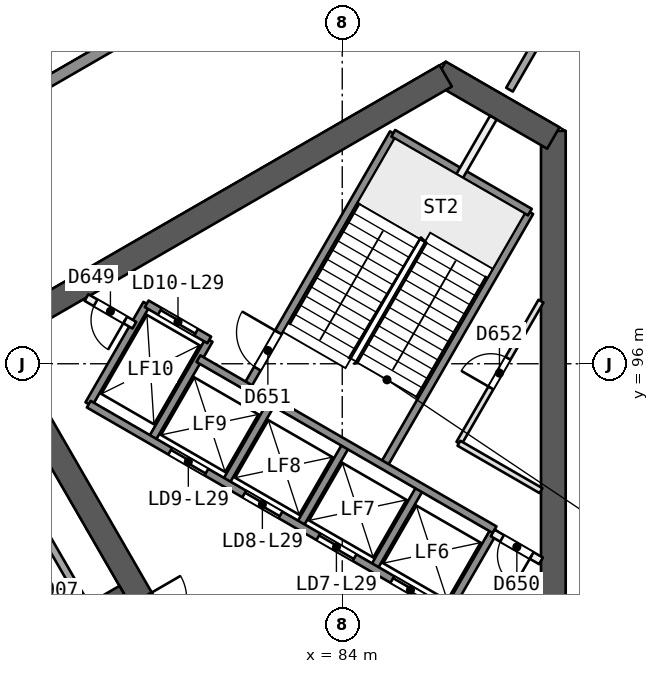
"""IFC4 building model, lengths in metres.
Left out: names, types, materials, properties, quantities, classifications, styles, units other than length and angle.
Written with IfcOpenShell. Run it as: python <this file> out.ifc"""

import sys

from ifc_helpers import new_model, si_unit, direction, frame, frame_2d, origin, place, context, subcontext, project, spatial, rectangle, extrude, element, fill, save


model = new_model("IFC4")
c1 = context("Model", 3, precision=1e-05, world=origin(), true_north=direction((0.0, 1.0)))
c2 = subcontext(c1, "Body", "Model", "MODEL_VIEW")
j1 = project(units=[si_unit("LENGTHUNIT", "METRE"), si_unit("PLANEANGLEUNIT", "RADIAN")], contexts=[c1])
p1 = place(None, origin())
s1 = spatial("IfcSite", under=j1, at=p1, CompositionType="ELEMENT")
p2 = place(p1, origin())
s2 = spatial("IfcBuilding", under=s1, at=p2, CompositionType="ELEMENT")
p3 = place(p2, frame((0.0, 0.0, 121.6)))
s3 = spatial("IfcBuildingStorey", under=s2, at=p3, CompositionType="ELEMENT", Elevation=121.6)
p4 = place(p3, frame((89.555, 88.119, 0.0), z_axis=(0.0, 0.0, 1.0), x_axis=(0.0, 1.0, 0.0)))
e1 = element("IfcWall", 1, at=p4, inside=s3, PredefinedType="SHEAR", context=c2, shape_type="SweptSolid", body=[
    extrude(rectangle(XDim=14.009, YDim=0.65, at=frame_2d((7.004, 0.0))), origin(), (0.0, 0.0, 1.0), 3.7),
])
p5 = place(p3, frame((89.555, 101.94, 0.0), z_axis=(0.0, 0.0, 1.0), x_axis=(-0.866031550877, 0.499989352773, 0.0)))
e2 = element("IfcWall", 2, at=p5, inside=s3, PredefinedType="SHEAR", context=c2, shape_type="SweptSolid", body=[
    extrude(rectangle(XDim=3.458, YDim=0.65, at=frame_2d((1.729, 0.0))), origin(), (0.0, 0.0, 1.0), 3.7),
])
p6 = place(p3, frame((86.723, 103.575, 0.0), z_axis=(0.0, 0.0, 1.0), x_axis=(-0.866031824457, -0.499988878904, 0.0)))
e3 = element("IfcWall", 3, at=p6, inside=s3, PredefinedType="SHEAR", context=c2, shape_type="SweptSolid", body=[
    extrude(rectangle(XDim=14.146, YDim=0.65, at=frame_2d((7.073, 0.0))), origin(), (0.0, 0.0, 1.0), 3.7),
])
p7 = place(p3, frame((74.754, 96.665, 0.0), z_axis=(0.0, 0.0, 1.0), x_axis=(0.500011799426, -0.866018591275, 0.0)))
e4 = element("IfcWall", 4, at=p7, inside=s3, PredefinedType="SHEAR", context=c2, shape_type="SweptSolid", body=[
    extrude(rectangle(XDim=10.055, YDim=0.65, at=frame_2d((5.027, 0.0))), origin(), (0.0, 0.0, 1.0), 3.7),
])
p8 = place(p7, frame((7.905, 0.0, 0.0)))
e5 = element("IfcOpeningElement", 5, at=p8, cuts=e4, PredefinedType="OPENING", context=c2, shape_type="SweptSolid", body=[
    extrude(rectangle(XDim=1.2, YDim=2.1, at=frame_2d((0.6, 1.05))), frame((0.0, 0.335, 0.0), z_axis=(0.0, -1.0, 0.0), x_axis=(1.0, 0.0, 0.0)), (0.0, 0.0, 1.0), 0.671),
])
p9 = place(p3, frame((78.2, 90.046, 0.0), z_axis=(0.0, 0.0, 1.0), x_axis=(-0.866026492143, -0.499998114903, 0.0)))
e6 = element("IfcWall", 6, at=p9, inside=s3, PredefinedType="SHEAR", context=c2, shape_type="SweptSolid", body=[
    extrude(rectangle(XDim=15.588, YDim=0.25, at=frame_2d((7.794, 0.0))), origin(), (0.0, 0.0, 1.0), 3.25),
])
p10 = place(p9, frame((1.527, 0.0, 0.0)))
e7 = element("IfcOpeningElement", 7, at=p10, cuts=e6, PredefinedType="OPENING", context=c2, shape_type="SweptSolid", body=[
    extrude(rectangle(XDim=1.0, YDim=2.1, at=frame_2d((0.5, 1.05))), frame((0.0, 0.135, 0.0), z_axis=(0.0, -1.0, 0.0), x_axis=(1.0, 0.0, 0.0)), (0.0, 0.0, 1.0), 0.271),
])
p11 = place(p9, frame((8.694, 0.0, 0.0)))
e8 = element("IfcOpeningElement", 8, at=p11, cuts=e6, PredefinedType="OPENING", context=c2, shape_type="SweptSolid", body=[
    extrude(rectangle(XDim=1.1, YDim=2.1, at=frame_2d((0.55, 1.05))), frame((0.0, 0.135, 0.0), z_axis=(0.0, -1.0, 0.0), x_axis=(1.0, 0.0, 0.0)), (0.0, 0.0, 1.0), 0.271),
])
p12 = place(p9, frame((13.062, 0.0, 0.0)))
e9 = element("IfcOpeningElement", 9, at=p12, cuts=e6, PredefinedType="OPENING", context=c2, shape_type="SweptSolid", body=[
    extrude(rectangle(XDim=1.0, YDim=2.1, at=frame_2d((0.5, 1.05))), frame((0.0, 0.135, 0.0), z_axis=(0.0, -1.0, 0.0), x_axis=(1.0, 0.0, 0.0)), (0.0, 0.0, 1.0), 0.271),
])
p13 = place(p3, frame((92.073, 109.571, 0.0), z_axis=(0.0, 0.0, 1.0), x_axis=(-0.49997955719, -0.866037206124, 0.0)))
e10 = element("IfcWall", 10, at=p13, inside=s3, PredefinedType="PARTITIONING", context=c2, shape_type="SweptSolid", body=[
    extrude(rectangle(XDim=7.343, YDim=0.2, at=frame_2d((3.671, 0.0))), origin(), (0.0, 0.0, 1.0), 3.25),
])
p14 = place(p3, frame((72.811, 97.327, 0.0), z_axis=(0.0, 0.0, 1.0), x_axis=(0.5000018851, -0.866024315419, 0.0)))
e11 = element("IfcWall", 11, at=p14, inside=s3, PredefinedType="PARTITIONING", context=c2, shape_type="SweptSolid", body=[
    extrude(rectangle(XDim=9.0, YDim=0.2, at=frame_2d((4.5, 0.0))), origin(), (0.0, 0.0, 1.0), 3.25),
])
p15 = place(p3, frame((40.706, 82.891, 0.0), z_axis=(0.0, 0.0, 1.0), x_axis=(0.866024855185, 0.5000009502, 0.0)))
e12 = element("IfcWall", 12, at=p15, inside=s3, PredefinedType="SOLIDWALL", context=c2, shape_type="SweptSolid", body=[
    extrude(rectangle(XDim=56.508, YDim=0.3, at=frame_2d((28.254, 0.0))), origin(), (0.0, 0.0, 1.0), 3.25),
])
p16 = place(p15, frame((27.054, 0.0, 0.0)))
e13 = element("IfcOpeningElement", 13, at=p16, cuts=e12, PredefinedType="OPENING", context=c2, shape_type="SweptSolid", body=[
    extrude(rectangle(XDim=2.4, YDim=2.4, at=frame_2d((1.2, 1.2))), frame((0.0, 0.161, 0.0), z_axis=(0.0, -1.0, 0.0), x_axis=(1.0, 0.0, 0.0)), (0.0, 0.0, 1.0), 0.321),
])
p17 = place(p15, frame((32.822, 0.0, 0.0)))
e14 = element("IfcOpeningElement", 14, at=p17, cuts=e12, PredefinedType="OPENING", context=c2, shape_type="SweptSolid", body=[
    extrude(rectangle(XDim=2.4, YDim=2.4, at=frame_2d((1.2, 1.2))), frame((0.0, 0.161, 0.0), z_axis=(0.0, -1.0, 0.0), x_axis=(1.0, 0.0, 0.0)), (0.0, 0.0, 1.0), 0.321),
])
p18 = place(p15, frame((43.875, 0.0, 0.0)))
e15 = element("IfcOpeningElement", 15, at=p18, cuts=e12, PredefinedType="OPENING", context=c2, shape_type="SweptSolid", body=[
    extrude(rectangle(XDim=2.4, YDim=2.4, at=frame_2d((1.2, 1.2))), frame((0.0, 0.161, 0.0), z_axis=(0.0, -1.0, 0.0), x_axis=(1.0, 0.0, 0.0)), (0.0, 0.0, 1.0), 0.321),
])
p19 = place(p15, frame((21.286, 0.0, 0.0)))
e16 = element("IfcOpeningElement", 16, at=p19, cuts=e12, PredefinedType="OPENING", context=c2, shape_type="SweptSolid", body=[
    extrude(rectangle(XDim=2.4, YDim=2.4, at=frame_2d((1.2, 1.2))), frame((0.0, 0.161, 0.0), z_axis=(0.0, -1.0, 0.0), x_axis=(1.0, 0.0, 0.0)), (0.0, 0.0, 1.0), 0.321),
])
p20 = place(p15, frame((10.251, 0.0, 0.0)))
e17 = element("IfcOpeningElement", 17, at=p20, cuts=e12, PredefinedType="OPENING", context=c2, shape_type="SweptSolid", body=[
    extrude(rectangle(XDim=2.4, YDim=2.4, at=frame_2d((1.2, 1.2))), frame((0.0, 0.161, 0.0), z_axis=(0.0, -1.0, 0.0), x_axis=(1.0, 0.0, 0.0)), (0.0, 0.0, 1.0), 0.321),
])
p21 = place(p3, frame((86.77, 89.486, 0.0), z_axis=(0.0, 0.0, 1.0), x_axis=(0.499961042966, 0.86604789447, 0.0)))
e18 = element("IfcWall", 18, at=p21, inside=s3, PredefinedType="SOLIDWALL", context=c2, shape_type="SweptSolid", body=[
    extrude(rectangle(XDim=2.48, YDim=0.2, at=frame_2d((1.24, 0.0))), origin(), (0.0, 0.0, 1.0), 3.25),
])
p22 = place(p3, frame((87.071, 93.908, 0.0), z_axis=(0.0, 0.0, 1.0), x_axis=(0.500012861172, 0.866017978256, 0.0)))
e19 = element("IfcWall", 19, at=p22, inside=s3, PredefinedType="PARTITIONING", context=c2, shape_type="SweptSolid", body=[
    extrude(rectangle(XDim=4.318, YDim=0.15, at=frame_2d((2.159, 0.0))), origin(), (0.0, 0.0, 1.0), 3.25),
])
p23 = place(p22, frame((1.681, 0.0, 0.0)))
e20 = element("IfcOpeningElement", 20, at=p23, cuts=e19, PredefinedType="OPENING", context=c2, shape_type="SweptSolid", body=[
    extrude(rectangle(XDim=0.9, YDim=2.1, at=frame_2d((0.45, 1.05))), frame((0.0, 0.085, 0.0), z_axis=(0.0, -1.0, 0.0), x_axis=(1.0, 0.0, 0.0)), (0.0, 0.0, 1.0), 0.171),
])
p24 = place(p3, frame((84.821, 90.611, 0.0), z_axis=(0.0, 0.0, 1.0), x_axis=(0.499961042966, 0.86604789447, 0.0)))
e21 = element("IfcWall", 21, at=p24, inside=s3, PredefinedType="SOLIDWALL", context=c2, shape_type="SweptSolid", body=[
    extrude(rectangle(XDim=2.48, YDim=0.2, at=frame_2d((1.24, 0.0))), origin(), (0.0, 0.0, 1.0), 3.25),
])
p25 = place(p3, frame((85.087, 93.321, 0.0), z_axis=(0.0, 0.0, 1.0), x_axis=(0.500019787375, 0.866013979237, 0.0)))
e22 = element("IfcWall", 22, at=p25, inside=s3, PredefinedType="SOLIDWALL", context=c2, shape_type="SweptSolid", body=[
    extrude(rectangle(XDim=7.7, YDim=0.2, at=frame_2d((3.85, 0.0))), origin(), (0.0, 0.0, 1.0), 3.25),
])
p26 = place(p3, frame((82.873, 91.736, 0.0), z_axis=(0.0, 0.0, 1.0), x_axis=(0.499961042966, 0.86604789447, 0.0)))
e23 = element("IfcWall", 23, at=p26, inside=s3, PredefinedType="SOLIDWALL", context=c2, shape_type="SweptSolid", body=[
    extrude(rectangle(XDim=2.48, YDim=0.2, at=frame_2d((1.24, 0.0))), origin(), (0.0, 0.0, 1.0), 3.25),
])
p27 = place(p3, frame((87.09, 100.94, 0.0), z_axis=(0.0, 0.0, 1.0), x_axis=(0.499944938281, 0.866057191349, 0.0)))
e24 = element("IfcWall", 24, at=p27, inside=s3, PredefinedType="PARTITIONING", context=c2, shape_type="SweptSolid", body=[
    extrude(rectangle(XDim=1.773, YDim=0.2, at=frame_2d((0.887, 0.0))), origin(), (0.0, 0.0, 1.0), 3.25),
])
p28 = place(p3, frame((80.924, 92.861, 0.0), z_axis=(0.0, 0.0, 1.0), x_axis=(0.499961042966, 0.86604789447, 0.0)))
e25 = element("IfcWall", 25, at=p28, inside=s3, PredefinedType="SOLIDWALL", context=c2, shape_type="SweptSolid", body=[
    extrude(rectangle(XDim=2.48, YDim=0.2, at=frame_2d((1.24, 0.0))), origin(), (0.0, 0.0, 1.0), 3.25),
])
p29 = place(p3, frame((81.493, 95.396, 0.0), z_axis=(0.0, 0.0, 1.0), x_axis=(0.500006057782, 0.866021906294, 0.0)))
e26 = element("IfcWall", 26, at=p29, inside=s3, PredefinedType="SOLIDWALL", context=c2, shape_type="SweptSolid", body=[
    extrude(rectangle(XDim=7.7, YDim=0.2, at=frame_2d((3.85, 0.0))), origin(), (0.0, 0.0, 1.0), 3.25),
])
p30 = place(p29, frame((0.55, 0.0, 0.0)))
e27 = element("IfcOpeningElement", 27, at=p30, cuts=e26, PredefinedType="OPENING", context=c2, shape_type="SweptSolid", body=[
    extrude(rectangle(XDim=1.1, YDim=2.1, at=frame_2d((0.55, 1.05))), frame((0.0, 0.11, 0.0), z_axis=(0.0, -1.0, 0.0), x_axis=(1.0, 0.0, 0.0)), (0.0, 0.0, 1.0), 0.221),
])
for number, where, z_axis, x_axis in (
    (28, (78.976, 93.986, 0.0), (0.0, 0.0, 1.0), (0.5, 0.866, 0.0)),
    (29, (77.33, 94.936, 0.0), (0.0, 0.0, 1.0), (0.5, 0.866, 0.0)),
):
    element("IfcWall", number, at=place(p3, frame(where, z_axis=z_axis, x_axis=x_axis)), inside=s3, PredefinedType="SOLIDWALL", context=c2, shape_type="SweptSolid", body=[
        extrude(rectangle(XDim=3.05, YDim=0.2, at=frame_2d((1.525, 0.0))), origin(), (0.0, 0.0, 1.0), 3.25),
    ])
p31 = place(p3, frame((86.77, 89.486, 0.0), z_axis=(0.0, 0.0, 1.0), x_axis=(-0.86601811187, 0.500012629753, 0.0)))
e30 = element("IfcWall", 30, at=p31, inside=s3, PredefinedType="SOLIDWALL", context=c2, shape_type="SweptSolid", body=[
    extrude(rectangle(XDim=10.9, YDim=0.2, at=frame_2d((5.45, 0.0))), origin(), (0.0, 0.0, 1.0), 3.25),
])
p32 = place(p31, frame((0.575, 0.0, 0.0)))
e31 = element("IfcOpeningElement", 31, at=p32, cuts=e30, PredefinedType="OPENING", context=c2, shape_type="SweptSolid", body=[
    extrude(rectangle(XDim=1.1, YDim=2.1, at=frame_2d((0.55, 1.05))), frame((0.0, 0.11, 0.0), z_axis=(0.0, -1.0, 0.0), x_axis=(1.0, 0.0, 0.0)), (0.0, 0.0, 1.0), 0.221),
])
p33 = place(p31, frame((2.825, 0.0, 0.0)))
e32 = element("IfcOpeningElement", 32, at=p33, cuts=e30, PredefinedType="OPENING", context=c2, shape_type="SweptSolid", body=[
    extrude(rectangle(XDim=1.1, YDim=2.1, at=frame_2d((0.55, 1.05))), frame((0.0, 0.11, 0.0), z_axis=(0.0, -1.0, 0.0), x_axis=(1.0, 0.0, 0.0)), (0.0, 0.0, 1.0), 0.221),
])
p34 = place(p31, frame((5.075, 0.0, 0.0)))
e33 = element("IfcOpeningElement", 33, at=p34, cuts=e30, PredefinedType="OPENING", context=c2, shape_type="SweptSolid", body=[
    extrude(rectangle(XDim=1.1, YDim=2.1, at=frame_2d((0.55, 1.05))), frame((0.0, 0.11, 0.0), z_axis=(0.0, -1.0, 0.0), x_axis=(1.0, 0.0, 0.0)), (0.0, 0.0, 1.0), 0.221),
])
p35 = place(p31, frame((7.325, 0.0, 0.0)))
e34 = element("IfcOpeningElement", 34, at=p35, cuts=e30, PredefinedType="OPENING", context=c2, shape_type="SweptSolid", body=[
    extrude(rectangle(XDim=1.1, YDim=2.1, at=frame_2d((0.55, 1.05))), frame((0.0, 0.11, 0.0), z_axis=(0.0, -1.0, 0.0), x_axis=(1.0, 0.0, 0.0)), (0.0, 0.0, 1.0), 0.221),
])
p36 = place(p3, frame((89.23, 90.814, 0.0), z_axis=(0.0, 0.0, 1.0), x_axis=(-0.866022048785, 0.500005810984, 0.0)))
e35 = element("IfcWall", 35, at=p36, inside=s3, PredefinedType="PARTITIONING", context=c2, shape_type="SweptSolid", body=[
    extrude(rectangle(XDim=1.467, YDim=0.2, at=frame_2d((0.733, 0.0))), origin(), (0.0, 0.0, 1.0), 3.25),
])
p37 = place(p36, frame((0.283, 0.0, 0.0)))
e36 = element("IfcOpeningElement", 36, at=p37, cuts=e35, PredefinedType="OPENING", context=c2, shape_type="SweptSolid", body=[
    extrude(rectangle(XDim=0.9, YDim=2.1, at=frame_2d((0.45, 1.05))), frame((0.0, 0.11, 0.0), z_axis=(0.0, -1.0, 0.0), x_axis=(1.0, 0.0, 0.0)), (0.0, 0.0, 1.0), 0.221),
])
p38 = place(p3, frame((78.53, 97.014, 0.0), z_axis=(0.0, 0.0, 1.0), x_axis=(-0.866045896294, 0.499964504253, 0.0)))
e37 = element("IfcWall", 37, at=p38, inside=s3, PredefinedType="PARTITIONING", context=c2, shape_type="SweptSolid", body=[
    extrude(rectangle(XDim=1.455, YDim=0.2, at=frame_2d((0.728, 0.0))), origin(), (0.0, 0.0, 1.0), 3.25),
])
p39 = place(p38, frame((0.278, 0.0, 0.0)))
e38 = element("IfcOpeningElement", 38, at=p39, cuts=e37, PredefinedType="OPENING", context=c2, shape_type="SweptSolid", body=[
    extrude(rectangle(XDim=0.9, YDim=2.1, at=frame_2d((0.45, 1.05))), frame((0.0, 0.11, 0.0), z_axis=(0.0, -1.0, 0.0), x_axis=(1.0, 0.0, 0.0)), (0.0, 0.0, 1.0), 0.221),
])
p40 = place(p3, frame((88.01, 91.634, 0.0), z_axis=(0.0, 0.0, 1.0), x_axis=(-0.866024315419, 0.5000018851, 0.0)))
e39 = element("IfcWall", 39, at=p40, inside=s3, PredefinedType="SOLIDWALL", context=c2, shape_type="SweptSolid", body=[
    extrude(rectangle(XDim=9.0, YDim=0.2, at=frame_2d((4.5, 0.0))), origin(), (0.0, 0.0, 1.0), 3.25),
])
p41 = place(p3, frame((80.5, 96.627, 0.0), z_axis=(0.0, 0.0, 1.0), x_axis=(-0.86601224135, 0.500022797313, 0.0)))
e40 = element("IfcWall", 40, at=p41, inside=s3, PredefinedType="SOLIDWALL", context=c2, shape_type="SweptSolid", body=[
    extrude(rectangle(XDim=1.9, YDim=0.2, at=frame_2d((0.95, 0.0))), origin(), (0.0, 0.0, 1.0), 3.25),
])
p42 = place(p41, frame((0.4, 0.0, 0.0)))
e41 = element("IfcOpeningElement", 41, at=p42, cuts=e40, PredefinedType="OPENING", context=c2, shape_type="SweptSolid", body=[
    extrude(rectangle(XDim=1.1, YDim=2.1, at=frame_2d((0.55, 1.05))), frame((0.0, 0.11, 0.0), z_axis=(0.0, -1.0, 0.0), x_axis=(1.0, 0.0, 0.0)), (0.0, 0.0, 1.0), 0.221),
])
p43 = place(p3, frame((89.23, 92.661, 0.0), z_axis=(0.0, 0.0, 1.0), x_axis=(-0.866046964233, 0.499962654349, 0.0)))
e42 = element("IfcWall", 42, at=p43, inside=s3, PredefinedType="PARTITIONING", context=c2, shape_type="SweptSolid", body=[
    extrude(rectangle(XDim=2.493, YDim=0.15, at=frame_2d((1.247, 0.0))), origin(), (0.0, 0.0, 1.0), 3.25),
])
p44 = place(p3, frame((88.937, 99.99, 0.0), z_axis=(0.0, 0.0, 1.0), x_axis=(-0.866004344652, 0.500036473714, 0.0)))
e43 = element("IfcWall", 43, at=p44, inside=s3, PredefinedType="SOLIDWALL", context=c2, shape_type="SweptSolid", body=[
    extrude(rectangle(XDim=4.15, YDim=0.2, at=frame_2d((2.075, 0.0))), origin(), (0.0, 0.0, 1.0), 3.25),
])
p45 = place(p32, origin())
e44 = element("IfcDoor", 44, at=p45, inside=s3, OperationType="SLIDING_TO_RIGHT", PredefinedType="NOTDEFINED", context=c2, shape_type="SweptSolid", body=[
    extrude(rectangle(XDim=1.1, YDim=2.1, at=frame_2d((0.55, 1.05))), frame((0.0, 0.025, 0.0), z_axis=(0.0, -1.0, 0.0), x_axis=(1.0, 0.0, 0.0)), (0.0, 0.0, 1.0), 0.05),
])
fill(e31, e44)
p46 = place(p33, origin())
e45 = element("IfcDoor", 45, at=p46, inside=s3, OperationType="SLIDING_TO_LEFT", PredefinedType="NOTDEFINED", context=c2, shape_type="SweptSolid", body=[
    extrude(rectangle(XDim=1.1, YDim=2.1, at=frame_2d((0.55, 1.05))), frame((0.0, 0.025, 0.0), z_axis=(0.0, -1.0, 0.0), x_axis=(1.0, 0.0, 0.0)), (0.0, 0.0, 1.0), 0.05),
])
fill(e32, e45)
p47 = place(p34, origin())
e46 = element("IfcDoor", 46, at=p47, inside=s3, OperationType="SLIDING_TO_RIGHT", PredefinedType="NOTDEFINED", context=c2, shape_type="SweptSolid", body=[
    extrude(rectangle(XDim=1.1, YDim=2.1, at=frame_2d((0.55, 1.05))), frame((0.0, 0.025, 0.0), z_axis=(0.0, -1.0, 0.0), x_axis=(1.0, 0.0, 0.0)), (0.0, 0.0, 1.0), 0.05),
])
fill(e33, e46)
p48 = place(p35, origin())
e47 = element("IfcDoor", 47, at=p48, inside=s3, OperationType="SLIDING_TO_LEFT", PredefinedType="NOTDEFINED", context=c2, shape_type="SweptSolid", body=[
    extrude(rectangle(XDim=1.1, YDim=2.1, at=frame_2d((0.55, 1.05))), frame((0.0, 0.025, 0.0), z_axis=(0.0, -1.0, 0.0), x_axis=(1.0, 0.0, 0.0)), (0.0, 0.0, 1.0), 0.05),
])
fill(e34, e47)
p49 = place(p42, origin())
e48 = element("IfcDoor", 48, at=p49, inside=s3, OperationType="SLIDING_TO_RIGHT", PredefinedType="NOTDEFINED", context=c2, shape_type="SweptSolid", body=[
    extrude(rectangle(XDim=1.1, YDim=2.1, at=frame_2d((0.55, 1.05))), frame((0.0, 0.025, 0.0), z_axis=(0.0, -1.0, 0.0), x_axis=(1.0, 0.0, 0.0)), (0.0, 0.0, 1.0), 0.05),
])
fill(e41, e48)
p50 = place(p39, origin())
e49 = element("IfcDoor", 49, at=p50, inside=s3, OperationType="SINGLE_SWING_LEFT", PredefinedType="NOTDEFINED", context=c2, shape_type="SweptSolid", body=[
    extrude(rectangle(XDim=0.9, YDim=2.1, at=frame_2d((0.45, 1.05))), frame((0.0, 0.025, 0.0), z_axis=(0.0, -1.0, 0.0), x_axis=(1.0, 0.0, 0.0)), (0.0, 0.0, 1.0), 0.05),
])
fill(e38, e49)
p51 = place(p37, origin())
e50 = element("IfcDoor", 50, at=p51, inside=s3, OperationType="SINGLE_SWING_LEFT", PredefinedType="NOTDEFINED", context=c2, shape_type="SweptSolid", body=[
    extrude(rectangle(XDim=0.9, YDim=2.1, at=frame_2d((0.45, 1.05))), frame((0.0, 0.025, 0.0), z_axis=(0.0, -1.0, 0.0), x_axis=(1.0, 0.0, 0.0)), (0.0, 0.0, 1.0), 0.05),
])
fill(e36, e50)
p52 = place(p30, origin())
e51 = element("IfcDoor", 51, at=p52, inside=s3, OperationType="SINGLE_SWING_RIGHT", PredefinedType="NOTDEFINED", context=c2, shape_type="SweptSolid", body=[
    extrude(rectangle(XDim=1.1, YDim=2.1, at=frame_2d((0.55, 1.05))), frame((0.0, 0.025, 0.0), z_axis=(0.0, -1.0, 0.0), x_axis=(1.0, 0.0, 0.0)), (0.0, 0.0, 1.0), 0.05),
])
fill(e27, e51)
p53 = place(p23, origin())
e52 = element("IfcDoor", 52, at=p53, inside=s3, OperationType="SINGLE_SWING_LEFT", PredefinedType="NOTDEFINED", context=c2, shape_type="SweptSolid", body=[
    extrude(rectangle(XDim=0.9, YDim=2.1, at=frame_2d((0.45, 1.05))), frame((0.0, 0.025, 0.0), z_axis=(0.0, -1.0, 0.0), x_axis=(1.0, 0.0, 0.0)), (0.0, 0.0, 1.0), 0.05),
])
fill(e20, e52)
save(model, sys.argv[1])
